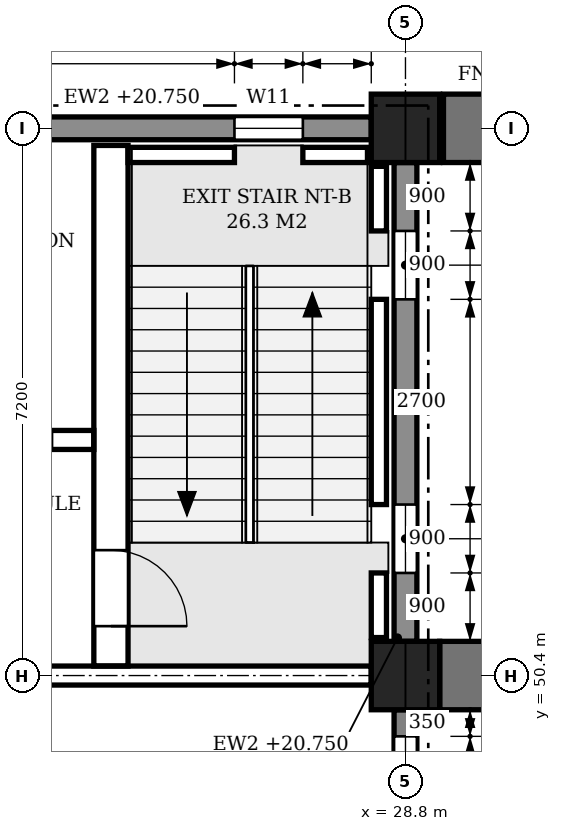
"""IFC4 building model, lengths in metres.
Left out: names, types, materials, properties, quantities, classifications, styles, units other than length and angle.
Written with IfcOpenShell. Run it as: python <this file> out.ifc"""

import sys

from ifc_helpers import new_model, si_unit, direction, frame, frame_2d, origin, origin_2d, place, context, subcontext, project, spatial, polyline, rectangle, outline, extrude, element, fill, save


model = new_model("IFC4")
c1 = context("Model", 3, precision=1e-05, world=origin(), true_north=direction((0.0, 1.0)))
c2 = subcontext(c1, "Body", "Model", "MODEL_VIEW")
j1 = project(units=[si_unit("LENGTHUNIT", "METRE"), si_unit("PLANEANGLEUNIT", "RADIAN")], contexts=[c1])
p1 = place(None, origin())
s1 = spatial("IfcSite", under=j1, at=p1, CompositionType="ELEMENT")
p2 = place(p1, origin())
s2 = spatial("IfcBuilding", under=s1, at=p2, CompositionType="ELEMENT")
p3 = place(p2, frame((0.0, 0.0, 16.8)))
s3 = spatial("IfcBuildingStorey", under=s2, at=p3, CompositionType="ELEMENT", Elevation=16.8)
for number, where, z_axis, x_axis in (
    (1, (28.8, 50.4, 0.0), (0.0, 0.0, 1.0), (1.0, 0.0, 0.0)),
    (2, (28.8, 57.6, 0.0), (0.0, 0.0, 1.0), (1.0, 0.0, 0.0)),
):
    element("IfcColumn", number, at=place(p3, frame(where, z_axis=z_axis, x_axis=x_axis)), inside=s3, PredefinedType="COLUMN", context=c2, shape_type="SweptSolid", body=[
        extrude(rectangle(XDim=0.9, YDim=0.9, at=origin_2d()), origin(), (0.0, 0.0, 1.0), 4.8),
    ])
p4 = place(p3, frame((28.35, 57.6, 0.0), z_axis=(0.0, 0.0, 1.0), x_axis=(-1.0, 0.0, 0.0)))
e3 = element("IfcWall", 3, at=p4, inside=s3, PredefinedType="STANDARD", context=c2, shape_type="SweptSolid", body=[
    extrude(rectangle(XDim=6.3, YDim=0.3, at=frame_2d((3.15, 0.0))), origin(), (0.0, 0.0, 1.0), 3.95),
])
p5 = place(p4, frame((0.9, 0.0, 0.9)))
e4 = element("IfcOpeningElement", 4, at=p5, cuts=e3, PredefinedType="OPENING", context=c2, shape_type="SweptSolid", body=[
    extrude(outline(polyline([(0.0, 0.0), (0.9, 0.0), (0.9, 2.05), (0.45, 2.5), (0.0, 2.05), (0.0, 0.0)])), frame((0.0, 0.16, 0.0), z_axis=(0.0, -1.0, 0.0), x_axis=(1.0, 0.0, 0.0)), (0.0, 0.0, 1.0), 0.32),
])
p6 = place(p3, frame((28.8, 43.65, 0.0), z_axis=(0.0, 0.0, 1.0), x_axis=(0.0, 1.0, 0.0)))
e5 = element("IfcWall", 5, at=p6, inside=s3, PredefinedType="STANDARD", context=c2, shape_type="SweptSolid", body=[
    extrude(rectangle(XDim=6.3, YDim=0.3, at=frame_2d((3.15, 0.0))), origin(), (0.0, 0.0, 1.0), 3.95),
])
p7 = place(p6, frame((3.95, 0.0, 0.9)))
e6 = element("IfcOpeningElement", 6, at=p7, cuts=e5, PredefinedType="OPENING", context=c2, shape_type="SweptSolid", body=[
    extrude(outline(polyline([(0.0, 0.0), (0.85, 0.0), (0.85, 2.05), (0.425, 2.5), (0.0, 2.05), (0.0, 0.0)])), frame((0.0, 0.16, 0.0), z_axis=(0.0, -1.0, 0.0), x_axis=(1.0, 0.0, 0.0)), (0.0, 0.0, 1.0), 0.32),
])
p8 = place(p6, frame((5.1, 0.0, 0.9)))
e7 = element("IfcOpeningElement", 7, at=p8, cuts=e5, PredefinedType="OPENING", context=c2, shape_type="SweptSolid", body=[
    extrude(outline(polyline([(0.0, 0.0), (0.85, 0.0), (0.85, 2.05), (0.425, 2.5), (0.0, 2.05), (0.0, 0.0)])), frame((0.0, 0.16, 0.0), z_axis=(0.0, -1.0, 0.0), x_axis=(1.0, 0.0, 0.0)), (0.0, 0.0, 1.0), 0.32),
])
p9 = place(p3, frame((28.8, 50.85, 0.0), z_axis=(0.0, 0.0, 1.0), x_axis=(0.0, 1.0, 0.0)))
e8 = element("IfcWall", 8, at=p9, inside=s3, PredefinedType="STANDARD", context=c2, shape_type="SweptSolid", body=[
    extrude(rectangle(XDim=6.3, YDim=0.3, at=frame_2d((3.15, 0.0))), origin(), (0.0, 0.0, 1.0), 3.95),
])
p10 = place(p9, frame((0.9, 0.0, 0.9)))
e9 = element("IfcOpeningElement", 9, at=p10, cuts=e8, PredefinedType="OPENING", context=c2, shape_type="SweptSolid", body=[
    extrude(outline(polyline([(0.0, 0.0), (0.9, 0.0), (0.9, 2.05), (0.45, 2.5), (0.0, 2.05), (0.0, 0.0)])), frame((0.0, 0.16, 0.0), z_axis=(0.0, -1.0, 0.0), x_axis=(1.0, 0.0, 0.0)), (0.0, 0.0, 1.0), 0.32),
])
p11 = place(p9, frame((4.5, 0.0, 0.9)))
e10 = element("IfcOpeningElement", 10, at=p11, cuts=e8, PredefinedType="OPENING", context=c2, shape_type="SweptSolid", body=[
    extrude(outline(polyline([(0.0, 0.0), (0.9, 0.0), (0.9, 2.05), (0.45, 2.5), (0.0, 2.05), (0.0, 0.0)])), frame((0.0, 0.16, 0.0), z_axis=(0.0, -1.0, 0.0), x_axis=(1.0, 0.0, 0.0)), (0.0, 0.0, 1.0), 0.32),
])
for number, where, z_axis, x_axis in (
    (11, (29.25, 50.4, 0.0), (0.0, 0.0, 1.0), (1.0, 0.0, 0.0)),
    (12, (29.3, 57.6, 0.0), (0.0, 0.0, 1.0), (1.0, 0.0, 0.0)),
):
    element("IfcWall", number, at=place(p3, frame(where, z_axis=z_axis, x_axis=x_axis)), inside=s3, PredefinedType="POLYGONAL", context=c2, shape_type="SweptSolid", body=[
        extrude(outline(polyline([(1.1, 0.0), (1.1, 4.55), (0.0, 4.55), (0.0, 0.0), (1.1, 0.0)])), frame((0.0, 0.45, 0.0), z_axis=(0.0, -1.0, 0.0), x_axis=(1.0, 0.0, 0.0)), (0.0, 0.0, 1.0), 0.9),
    ])
p12 = place(p3, frame((22.05, 50.4, 0.0), z_axis=(0.0, 0.0, 1.0), x_axis=(1.0, 0.0, 0.0)))
e13 = element("IfcWall", 13, at=p12, inside=s3, PredefinedType="SHEAR", context=c2, shape_type="SweptSolid", body=[
    extrude(rectangle(XDim=6.3, YDim=0.25, at=frame_2d((3.15, 0.0))), origin(), (0.0, 0.0, 1.0), 3.8),
])
p13 = place(p12, frame((0.4, 0.0, 0.0)))
e14 = element("IfcOpeningElement", 14, at=p13, cuts=e13, PredefinedType="OPENING", context=c2, shape_type="SweptSolid", body=[
    extrude(rectangle(XDim=1.1, YDim=2.1, at=frame_2d((0.55, 1.05))), frame((0.0, 0.135, 0.0), z_axis=(0.0, -1.0, 0.0), x_axis=(1.0, 0.0, 0.0)), (0.0, 0.0, 1.0), 0.27),
])
p14 = place(p3, frame((28.45, 50.9, -0.25), z_axis=(0.0, 0.0, 1.0), x_axis=(0.0, 1.0, 0.0)))
e15 = element("IfcWall", 15, at=p14, inside=s3, PredefinedType="SHEAR", context=c2, shape_type="SweptSolid", body=[
    extrude(rectangle(XDim=0.85, YDim=0.2, at=frame_2d((0.425, 0.0))), origin(), (0.0, 0.0, 1.0), 4.8),
])
p15 = place(p3, frame((28.45, 52.65, -0.25), z_axis=(0.0, 0.0, 1.0), x_axis=(0.0, 1.0, 0.0)))
e16 = element("IfcWall", 16, at=p15, inside=s3, PredefinedType="SHEAR", context=c2, shape_type="SweptSolid", body=[
    extrude(rectangle(XDim=2.7, YDim=0.2, at=frame_2d((1.35, 0.0))), origin(), (0.0, 0.0, 1.0), 4.8),
])
p16 = place(p3, frame((28.45, 56.25, -0.25), z_axis=(0.0, 0.0, 1.0), x_axis=(0.0, 1.0, 0.0)))
e17 = element("IfcWall", 17, at=p16, inside=s3, PredefinedType="SHEAR", context=c2, shape_type="SweptSolid", body=[
    extrude(rectangle(XDim=0.85, YDim=0.2, at=frame_2d((0.425, 0.0))), origin(), (0.0, 0.0, 1.0), 4.8),
])
p17 = place(p3, frame((25.15, 57.25, -0.25), z_axis=(0.0, 0.0, 1.0), x_axis=(1.0, 0.0, 0.0)))
e18 = element("IfcWall", 18, at=p17, inside=s3, PredefinedType="SHEAR", context=c2, shape_type="SweptSolid", body=[
    extrude(rectangle(XDim=1.4, YDim=0.2, at=frame_2d((0.7, 0.0))), origin(), (0.0, 0.0, 1.0), 4.8),
])
p18 = place(p3, frame((27.45, 57.25, -0.25), z_axis=(0.0, 0.0, 1.0), x_axis=(1.0, 0.0, 0.0)))
e19 = element("IfcWall", 19, at=p18, inside=s3, PredefinedType="SHEAR", context=c2, shape_type="SweptSolid", body=[
    extrude(rectangle(XDim=0.85, YDim=0.2, at=frame_2d((0.425, 0.0))), origin(), (0.0, 0.0, 1.0), 4.8),
])
p19 = place(p3, frame((24.925, 50.525, 0.0), z_axis=(0.0, 0.0, 1.0), x_axis=(0.0, 1.0, 0.0)))
e20 = element("IfcWall", 20, at=p19, inside=s3, PredefinedType="SHEAR", context=c2, shape_type="SweptSolid", body=[
    extrude(rectangle(XDim=6.85, YDim=0.45, at=frame_2d((3.425, 0.0))), origin(), (0.0, 0.0, 1.0), 4.55),
])
p20 = place(p19, frame((0.525, 0.0, 0.0)))
e21 = element("IfcOpeningElement", 21, at=p20, cuts=e20, PredefinedType="OPENING", context=c2, shape_type="SweptSolid", body=[
    extrude(rectangle(XDim=1.0, YDim=2.1, at=frame_2d((0.5, 1.05))), frame((0.0, 0.235, 0.0), z_axis=(0.0, -1.0, 0.0), x_axis=(1.0, 0.0, 0.0)), (0.0, 0.0, 1.0), 0.47),
])
p21 = place(p3, frame((21.725, 53.5, 0.0), z_axis=(0.0, 0.0, 1.0), x_axis=(1.0, 0.0, 0.0)))
e22 = element("IfcWall", 22, at=p21, inside=s3, PredefinedType="SHEAR", context=c2, shape_type="SweptSolid", body=[
    extrude(rectangle(XDim=2.975, YDim=0.25, at=frame_2d((1.487, 0.0))), origin(), (0.0, 0.0, 1.0), 4.55),
])
p22 = place(p21, frame((1.525, 0.0, 0.0)))
e23 = element("IfcOpeningElement", 23, at=p22, cuts=e22, PredefinedType="OPENING", context=c2, shape_type="SweptSolid", body=[
    extrude(rectangle(XDim=0.9, YDim=2.1, at=frame_2d((0.45, 1.05))), frame((0.0, 0.135, 0.0), z_axis=(0.0, -1.0, 0.0), x_axis=(1.0, 0.0, 0.0)), (0.0, 0.0, 1.0), 0.27),
])
p23 = place(p8, origin())
e24 = element("IfcWindow", 24, at=p23, inside=s3, PartitioningType="SINGLE_PANEL", PredefinedType="WINDOW", context=c2, shape_type="SweptSolid", body=[
    extrude(outline(polyline([(0.0, 0.0), (0.85, 0.0), (0.85, 2.05), (0.425, 2.5), (0.0, 2.05), (0.0, 0.0)])), frame((0.0, 0.03, 0.0), z_axis=(0.0, -1.0, 0.0), x_axis=(1.0, 0.0, 0.0)), (0.0, 0.0, 1.0), 0.06),
])
fill(e7, e24)
p24 = place(p10, origin())
e25 = element("IfcWindow", 25, at=p24, inside=s3, PartitioningType="SINGLE_PANEL", PredefinedType="WINDOW", context=c2, shape_type="SweptSolid", body=[
    extrude(outline(polyline([(0.0, 0.0), (0.9, 0.0), (0.9, 2.05), (0.45, 2.5), (0.0, 2.05), (0.0, 0.0)])), frame((0.0, 0.03, 0.0), z_axis=(0.0, -1.0, 0.0), x_axis=(1.0, 0.0, 0.0)), (0.0, 0.0, 1.0), 0.06),
])
fill(e9, e25)
p25 = place(p11, origin())
e26 = element("IfcWindow", 26, at=p25, inside=s3, PartitioningType="SINGLE_PANEL", PredefinedType="WINDOW", context=c2, shape_type="SweptSolid", body=[
    extrude(outline(polyline([(0.0, 0.0), (0.9, 0.0), (0.9, 2.05), (0.45, 2.5), (0.0, 2.05), (0.0, 0.0)])), frame((0.0, 0.03, 0.0), z_axis=(0.0, -1.0, 0.0), x_axis=(1.0, 0.0, 0.0)), (0.0, 0.0, 1.0), 0.06),
])
fill(e10, e26)
p26 = place(p5, origin())
e27 = element("IfcWindow", 27, at=p26, inside=s3, PartitioningType="SINGLE_PANEL", PredefinedType="WINDOW", context=c2, shape_type="SweptSolid", body=[
    extrude(outline(polyline([(0.0, 0.0), (0.9, 0.0), (0.9, 2.05), (0.45, 2.5), (0.0, 2.05), (0.0, 0.0)])), frame((0.0, 0.03, 0.0), z_axis=(0.0, -1.0, 0.0), x_axis=(1.0, 0.0, 0.0)), (0.0, 0.0, 1.0), 0.06),
])
fill(e4, e27)
p27 = place(p20, frame((1.0, 0.0, 0.0), z_axis=(0.0, 0.0, 1.0), x_axis=(-1.0, 0.0, 0.0)))
e28 = element("IfcDoor", 28, at=p27, inside=s3, OperationType="SINGLE_SWING_RIGHT", PredefinedType="DOOR", context=c2, shape_type="SweptSolid", body=[
    extrude(rectangle(XDim=1.0, YDim=2.1, at=frame_2d((0.5, 1.05))), frame((0.0, 0.025, 0.0), z_axis=(0.0, -1.0, 0.0), x_axis=(1.0, 0.0, 0.0)), (0.0, 0.0, 1.0), 0.05),
])
fill(e21, e28)
save(model, sys.argv[1])
